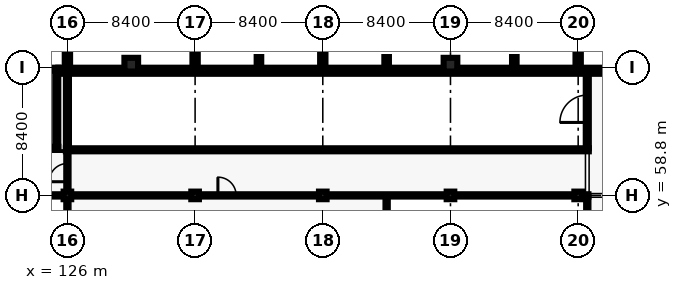
"""IFC4 building model, lengths in metres.
Left out: names, types, materials, properties, quantities, classifications, styles, units other than length and angle.
Written with IfcOpenShell. Run it as: python <this file> out.ifc"""

import sys

from ifc_helpers import new_model, si_unit, direction, frame, frame_2d, origin, origin_2d, place, context, subcontext, project, spatial, rectangle, extrude, element, fill, save


model = new_model("IFC4")
c1 = context("Model", 3, precision=1e-05, world=origin(), true_north=direction((0.0, 1.0)))
c2 = subcontext(c1, "Body", "Model", "MODEL_VIEW")
j1 = project(units=[si_unit("LENGTHUNIT", "METRE"), si_unit("PLANEANGLEUNIT", "RADIAN")], contexts=[c1])
p1 = place(None, origin())
s1 = spatial("IfcSite", under=j1, at=p1, CompositionType="ELEMENT")
p2 = place(p1, origin())
s2 = spatial("IfcBuilding", under=s1, at=p2, CompositionType="ELEMENT")
p3 = place(p2, frame((0.0, 0.0, 10.2)))
s3 = spatial("IfcBuildingStorey", under=s2, at=p3, CompositionType="ELEMENT", Elevation=10.2)
p4 = place(p3, frame((125.4, 61.9, 0.0), z_axis=(0.0, 0.0, 1.0), x_axis=(-1.0, 0.0, 0.0)))
e1 = element("IfcWall", 1, at=p4, inside=s3, PredefinedType="SHEAR", context=c2, shape_type="SweptSolid", body=[
    extrude(rectangle(XDim=3.6, YDim=0.2, at=frame_2d((1.8, 0.0))), origin(), (0.0, 0.0, 1.0), 4.8),
])
p5 = place(p4, frame((1.05, 0.0, 0.0)))
e2 = element("IfcOpeningElement", 2, at=p5, cuts=e1, PredefinedType="OPENING", context=c2, shape_type="SweptSolid", body=[
    extrude(rectangle(XDim=1.5, YDim=2.3, at=frame_2d((0.75, 1.15))), frame((0.0, 0.11, 0.0), z_axis=(0.0, -1.0, 0.0), x_axis=(1.0, 0.0, 0.0)), (0.0, 0.0, 1.0), 0.22),
])
p6 = place(p3, frame((121.8, 67.1, 0.0), z_axis=(0.0, 0.0, 1.0), x_axis=(1.0, 0.0, 0.0)))
e3 = element("IfcWall", 3, at=p6, inside=s3, PredefinedType="SHEAR", context=c2, shape_type="SweptSolid", body=[
    extrude(rectangle(XDim=3.6, YDim=0.2, at=frame_2d((1.8, 0.0))), origin(), (0.0, 0.0, 1.0), 4.8),
])
p7 = place(p3, frame((125.3, 67.0, 0.0), z_axis=(0.0, 0.0, 1.0), x_axis=(0.0, -1.0, 0.0)))
e4 = element("IfcWall", 4, at=p7, inside=s3, PredefinedType="SHEAR", context=c2, shape_type="SweptSolid", body=[
    extrude(rectangle(XDim=5.0, YDim=0.2, at=frame_2d((2.5, 0.0))), origin(), (0.0, 0.0, 1.0), 4.8),
])
p8 = place(p3, frame((125.4, 67.0, 0.0), z_axis=(0.0, 0.0, 1.0), x_axis=(1.0, 0.0, 0.0)))
e5 = element("IfcWall", 5, at=p8, inside=s3, PredefinedType="SHEAR", context=c2, shape_type="SweptSolid", body=[
    extrude(rectangle(XDim=37.8, YDim=0.4, at=frame_2d((18.9, 0.0))), origin(), (0.0, 0.0, 1.0), 4.8),
])
for number, where, z_axis, x_axis in (
    (6, (126.0, 58.8, 0.0), (0.0, 0.0, 1.0), (1.0, 0.0, 0.0)),
    (7, (134.4, 58.8, 0.0), (0.0, 0.0, 1.0), (1.0, 0.0, 0.0)),
    (8, (142.8, 58.8, 0.0), (0.0, 0.0, 1.0), (1.0, 0.0, 0.0)),
    (9, (151.2, 58.8, 0.0), (0.0, 0.0, 1.0), (1.0, 0.0, 0.0)),
    (10, (159.6, 58.8, 0.0), (0.0, 0.0, 1.0), (1.0, 0.0, 0.0)),
):
    element("IfcColumn", number, at=place(p3, frame(where, z_axis=z_axis, x_axis=x_axis)), inside=s3, PredefinedType="COLUMN", context=c2, shape_type="SweptSolid", body=[
        extrude(rectangle(XDim=0.5, YDim=0.5, at=origin_2d()), origin(), (0.0, 0.0, 1.0), 4.8),
    ])
for number, where, z_axis, x_axis in (
    (11, (130.2, 67.4, 3.8), (0.0, 0.0, 1.0), (1.0, 0.0, 0.0)),
    (12, (151.2, 67.4, 3.8), (0.0, 0.0, 1.0), (1.0, 0.0, 0.0)),
):
    element("IfcColumn", number, at=place(p3, frame(where, z_axis=z_axis, x_axis=x_axis)), inside=s3, PredefinedType="COLUMN", context=c2, shape_type="SweptSolid", body=[
        extrude(rectangle(XDim=0.9, YDim=0.9, at=origin_2d()), origin(), (0.0, 0.0, 1.0), 1.0),
    ])
for number, where, z_axis, x_axis in (
    (13, (126.0, 67.65, 0.0), (0.0, 0.0, 1.0), (1.0, 0.0, 0.0)),
    (14, (134.4, 67.65, 0.0), (0.0, 0.0, 1.0), (1.0, 0.0, 0.0)),
):
    element("IfcColumn", number, at=place(p3, frame(where, z_axis=z_axis, x_axis=x_axis)), inside=s3, PredefinedType="PILASTER", context=c2, shape_type="SweptSolid", body=[
        extrude(rectangle(XDim=0.35, YDim=0.9, at=origin_2d()), origin(), (0.0, 0.0, 1.0), 4.8),
    ])
p9 = place(p3, frame((138.6, 67.55, 0.0), z_axis=(0.0, 0.0, 1.0), x_axis=(1.0, 0.0, 0.0)))
e15 = element("IfcColumn", 15, at=p9, inside=s3, PredefinedType="PILASTER", context=c2, shape_type="SweptSolid", body=[
    extrude(rectangle(XDim=0.3, YDim=0.7, at=origin_2d()), origin(), (0.0, 0.0, 1.0), 4.8),
])
p10 = place(p3, frame((142.8, 67.65, 0.0), z_axis=(0.0, 0.0, 1.0), x_axis=(1.0, 0.0, 0.0)))
e16 = element("IfcColumn", 16, at=p10, inside=s3, PredefinedType="PILASTER", context=c2, shape_type="SweptSolid", body=[
    extrude(rectangle(XDim=0.35, YDim=0.9, at=origin_2d()), origin(), (0.0, 0.0, 1.0), 4.8),
])
for number, where, z_axis, x_axis in (
    (17, (147.0, 67.55, 0.0), (0.0, 0.0, 1.0), (1.0, 0.0, 0.0)),
    (18, (155.4, 67.55, 0.0), (0.0, 0.0, 1.0), (1.0, 0.0, 0.0)),
):
    element("IfcColumn", number, at=place(p3, frame(where, z_axis=z_axis, x_axis=x_axis)), inside=s3, PredefinedType="PILASTER", context=c2, shape_type="SweptSolid", body=[
        extrude(rectangle(XDim=0.3, YDim=0.7, at=origin_2d()), origin(), (0.0, 0.0, 1.0), 4.8),
    ])
p11 = place(p3, frame((159.6, 67.65, 0.0), z_axis=(0.0, 0.0, 1.0), x_axis=(1.0, 0.0, 0.0)))
e19 = element("IfcColumn", 19, at=p11, inside=s3, PredefinedType="PILASTER", context=c2, shape_type="SweptSolid", body=[
    extrude(rectangle(XDim=0.35, YDim=0.9, at=origin_2d()), origin(), (0.0, 0.0, 1.0), 4.8),
])
p12 = place(p3, frame((125.9, 61.8, 0.0), z_axis=(0.0, 0.0, 1.0), x_axis=(1.0, 0.0, 0.0)))
e20 = element("IfcWall", 20, at=p12, inside=s3, PredefinedType="SOLIDWALL", context=c2, shape_type="SweptSolid", body=[
    extrude(rectangle(XDim=34.4, YDim=0.2, at=frame_2d((17.2, 0.0))), origin(), (0.0, 0.0, 1.0), 4.5),
])
p13 = place(p3, frame((160.2, 61.9, 0.0), z_axis=(0.0, 0.0, 1.0), x_axis=(0.0, 1.0, 0.0)))
e21 = element("IfcWall", 21, at=p13, inside=s3, PredefinedType="SOLIDWALL", context=c2, shape_type="SweptSolid", body=[
    extrude(rectangle(XDim=4.9, YDim=0.2, at=frame_2d((2.45, 0.0))), origin(), (0.0, 0.0, 1.0), 4.5),
])
p14 = place(p13, frame((1.7, 0.0, 0.0)))
e22 = element("IfcOpeningElement", 22, at=p14, cuts=e21, PredefinedType="OPENING", context=c2, shape_type="SweptSolid", body=[
    extrude(rectangle(XDim=1.8, YDim=2.1, at=frame_2d((0.9, 1.05))), frame((0.0, 0.11, 0.0), z_axis=(0.0, -1.0, 0.0), x_axis=(1.0, 0.0, 0.0)), (0.0, 0.0, 1.0), 0.22),
])
p15 = place(p3, frame((126.0, 61.9, 0.0), z_axis=(0.0, 0.0, 1.0), x_axis=(0.0, 1.0, 0.0)))
e23 = element("IfcWall", 23, at=p15, inside=s3, PredefinedType="SHEAR", context=c2, shape_type="SweptSolid", body=[
    extrude(rectangle(XDim=4.9, YDim=0.2, at=frame_2d((2.45, 0.0))), origin(), (0.0, 0.0, 1.0), 4.5),
])
p16 = place(p3, frame((125.925, 58.8, 0.0), z_axis=(0.0, 0.0, 1.0), x_axis=(1.0, 0.0, 0.0)))
e24 = element("IfcWall", 24, at=p16, inside=s3, PredefinedType="PARTITIONING", context=c2, shape_type="SweptSolid", body=[
    extrude(rectangle(XDim=34.35, YDim=0.15, at=frame_2d((17.175, 0.0))), origin(), (0.0, 0.0, 1.0), 4.5),
])
p17 = place(p16, frame((9.975, 0.0, 0.0)))
e25 = element("IfcOpeningElement", 25, at=p17, cuts=e24, PredefinedType="OPENING", context=c2, shape_type="SweptSolid", body=[
    extrude(rectangle(XDim=1.2, YDim=2.1, at=frame_2d((0.6, 1.05))), frame((0.0, 0.085, 0.0), z_axis=(0.0, -1.0, 0.0), x_axis=(1.0, 0.0, 0.0)), (0.0, 0.0, 1.0), 0.17),
])
p18 = place(p3, frame((121.875, 58.8, 0.0), z_axis=(0.0, 0.0, 1.0), x_axis=(1.0, 0.0, 0.0)))
e26 = element("IfcWall", 26, at=p18, inside=s3, PredefinedType="SOLIDWALL", context=c2, shape_type="SweptSolid", body=[
    extrude(rectangle(XDim=4.05, YDim=0.15, at=frame_2d((2.025, 0.0))), origin(), (0.0, 0.0, 1.0), 4.5),
])
p19 = place(p18, frame((0.225, 0.0, 0.0)))
e27 = element("IfcOpeningElement", 27, at=p19, cuts=e26, PredefinedType="OPENING", context=c2, shape_type="SweptSolid", body=[
    extrude(rectangle(XDim=1.2, YDim=2.1, at=frame_2d((0.6, 1.05))), frame((0.0, 0.085, 0.0), z_axis=(0.0, -1.0, 0.0), x_axis=(1.0, 0.0, 0.0)), (0.0, 0.0, 1.0), 0.17),
])
for number, where, z_axis, x_axis in (
    (28, (126.0, 42.125, 0.0), (0.0, 0.0, 1.0), (0.0, 1.0, 0.0)),
    (29, (147.0, 42.125, 0.0), (0.0, 0.0, 1.0), (0.0, 1.0, 0.0)),
):
    element("IfcWall", number, at=place(p3, frame(where, z_axis=z_axis, x_axis=x_axis)), inside=s3, PredefinedType="PARTITIONING", context=c2, shape_type="SweptSolid", body=[
        extrude(rectangle(XDim=16.6, YDim=0.15, at=frame_2d((8.3, 0.0))), origin(), (0.0, 0.0, 1.0), 4.5),
    ])
p20 = place(p3, frame((160.2, 42.075, 0.0), z_axis=(0.0, 0.0, 1.0), x_axis=(0.0, 1.0, 0.0)))
e30 = element("IfcWall", 30, at=p20, inside=s3, PredefinedType="PARTITIONING", context=c2, shape_type="SweptSolid", body=[
    extrude(rectangle(XDim=16.65, YDim=0.15, at=frame_2d((8.325, 0.0))), origin(), (0.0, 0.0, 1.0), 4.5),
])
p21 = place(p3, frame((126.0, 58.875, 0.0), z_axis=(0.0, 0.0, 1.0), x_axis=(0.0, 1.0, 0.0)))
e31 = element("IfcWall", 31, at=p21, inside=s3, PredefinedType="SOLIDWALL", context=c2, shape_type="SweptSolid", body=[
    extrude(rectangle(XDim=2.825, YDim=0.15, at=frame_2d((1.413, 0.0))), origin(), (0.0, 0.0, 1.0), 4.5),
])
p22 = place(p21, frame((0.825, 0.0, 0.0)))
e32 = element("IfcOpeningElement", 32, at=p22, cuts=e31, PredefinedType="OPENING", context=c2, shape_type="SweptSolid", body=[
    extrude(rectangle(XDim=1.2, YDim=2.1, at=frame_2d((0.6, 1.05))), frame((0.0, 0.085, 0.0), z_axis=(0.0, -1.0, 0.0), x_axis=(1.0, 0.0, 0.0)), (0.0, 0.0, 1.0), 0.17),
])
p23 = place(p14, origin())
e33 = element("IfcDoor", 33, at=p23, inside=s3, OperationType="DOUBLE_DOOR_SINGLE_SWING", PredefinedType="DOOR", context=c2, shape_type="SweptSolid", body=[
    extrude(rectangle(XDim=1.8, YDim=2.1, at=frame_2d((0.9, 1.05))), frame((0.0, 0.025, 0.0), z_axis=(0.0, -1.0, 0.0), x_axis=(1.0, 0.0, 0.0)), (0.0, 0.0, 1.0), 0.05),
])
fill(e22, e33)
p24 = place(p17, origin())
e34 = element("IfcDoor", 34, at=p24, inside=s3, OperationType="SINGLE_SWING_RIGHT", PredefinedType="DOOR", context=c2, shape_type="SweptSolid", body=[
    extrude(rectangle(XDim=1.2, YDim=2.1, at=frame_2d((0.6, 1.05))), frame((0.0, 0.025, 0.0), z_axis=(0.0, -1.0, 0.0), x_axis=(1.0, 0.0, 0.0)), (0.0, 0.0, 1.0), 0.05),
])
fill(e25, e34)
p25 = place(p22, origin())
e35 = element("IfcDoor", 35, at=p25, inside=s3, OperationType="SINGLE_SWING_RIGHT", PredefinedType="DOOR", context=c2, shape_type="SweptSolid", body=[
    extrude(rectangle(XDim=1.2, YDim=2.1, at=frame_2d((0.6, 1.05))), frame((0.0, 0.025, 0.0), z_axis=(0.0, -1.0, 0.0), x_axis=(1.0, 0.0, 0.0)), (0.0, 0.0, 1.0), 0.05),
])
fill(e32, e35)
save(model, sys.argv[1])
